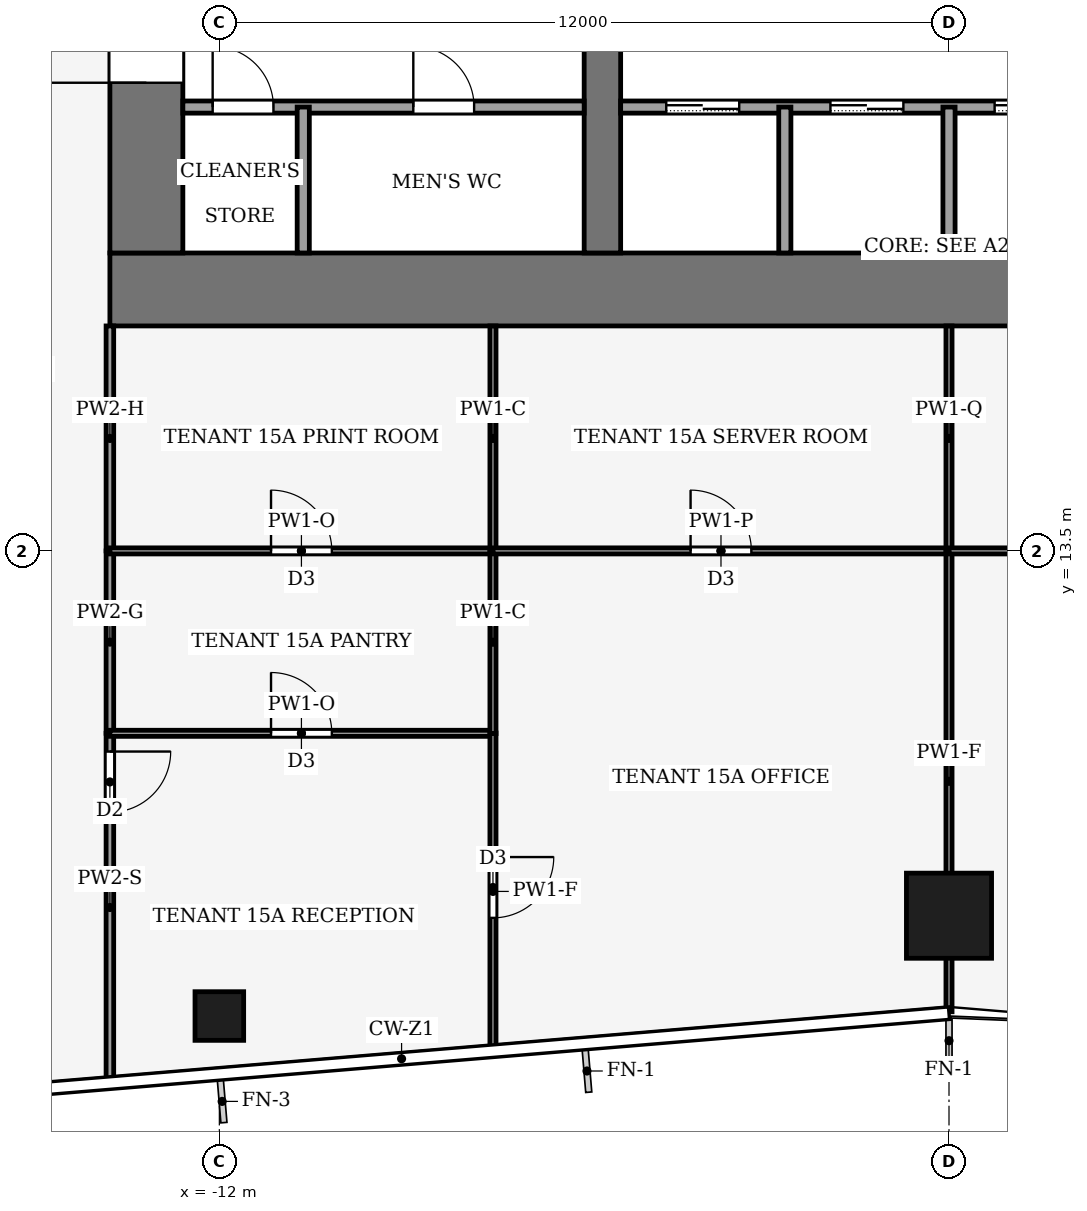
"""IFC4 building model, lengths in metres.
Left out: names, types, materials, properties, quantities, classifications, styles, units other than length and angle.
Written with IfcOpenShell. Run it as: python <this file> out.ifc"""

import sys

from ifc_helpers import new_model, si_unit, direction, frame, frame_2d, origin, origin_2d, place, context, subcontext, project, spatial, rectangle, hollow_rectangle, extrude, element, fill, save


model = new_model("IFC4")
c1 = context("Model", 3, precision=1e-05, world=origin(), true_north=direction((0.0, 1.0)))
c2 = subcontext(c1, "Body", "Model", "MODEL_VIEW")
j1 = project(units=[si_unit("LENGTHUNIT", "METRE"), si_unit("PLANEANGLEUNIT", "RADIAN")], contexts=[c1])
p1 = place(None, origin())
s1 = spatial("IfcSite", under=j1, at=p1, CompositionType="ELEMENT")
p2 = place(p1, origin())
s2 = spatial("IfcBuilding", under=s1, at=p2, CompositionType="ELEMENT")
p3 = place(p2, frame((0.0, 0.0, 70.0)))
s3 = spatial("IfcBuildingStorey", under=s2, at=p3, CompositionType="ELEMENT", Elevation=70.0)
p4 = place(p3, frame((-13.8, 17.8, -0.13), z_axis=(0.0, 0.0, 1.0), x_axis=(1.0, 0.0, 0.0)))
e1 = element("IfcWall", 1, at=p4, inside=s3, PredefinedType="SHEAR", context=c2, shape_type="SweptSolid", body=[
    extrude(rectangle(XDim=27.6, YDim=1.2, at=frame_2d((13.8, 0.0))), origin(), (0.0, 0.0, 1.0), 4.0),
])
p5 = place(p3, frame((-13.2, 18.4, -0.13), z_axis=(0.0, 0.0, 1.0), x_axis=(0.0, 1.0, 0.0)))
e2 = element("IfcWall", 2, at=p5, inside=s3, PredefinedType="SHEAR", context=c2, shape_type="SweptSolid", body=[
    extrude(rectangle(XDim=19.2, YDim=1.2, at=frame_2d((9.6, 0.0))), origin(), (0.0, 0.0, 1.0), 4.0),
])
p6 = place(p5, frame((2.8, 0.0, 0.13)))
e3 = element("IfcOpeningElement", 3, at=p6, cuts=e2, PredefinedType="OPENING", context=c2, shape_type="SweptSolid", body=[
    extrude(rectangle(XDim=2.4, YDim=2.4, at=frame_2d((1.2, 1.2))), frame((0.0, 0.61, 0.0), z_axis=(0.0, -1.0, 0.0), x_axis=(1.0, 0.0, 0.0)), (0.0, 0.0, 1.0), 1.22),
])
p7 = place(p5, frame((13.4, 0.0, 0.13)))
e4 = element("IfcOpeningElement", 4, at=p7, cuts=e2, PredefinedType="OPENING", context=c2, shape_type="SweptSolid", body=[
    extrude(rectangle(XDim=1.4, YDim=2.2, at=frame_2d((0.7, 1.1))), frame((0.0, 0.61, 0.0), z_axis=(0.0, -1.0, 0.0), x_axis=(1.0, 0.0, 0.0)), (0.0, 0.0, 1.0), 1.22),
])
p8 = place(p3, frame((-5.7, 18.4, -0.13), z_axis=(0.0, 0.0, 1.0), x_axis=(0.0, 1.0, 0.0)))
e5 = element("IfcWall", 5, at=p8, inside=s3, PredefinedType="SHEAR", context=c2, shape_type="SweptSolid", body=[
    extrude(rectangle(XDim=19.2, YDim=0.6, at=frame_2d((9.6, 0.0))), origin(), (0.0, 0.0, 1.0), 4.0),
])
p9 = place(p8, frame((8.35, 0.0, 0.13)))
e6 = element("IfcOpeningElement", 6, at=p9, cuts=e5, PredefinedType="OPENING", context=c2, shape_type="SweptSolid", body=[
    extrude(rectangle(XDim=0.9, YDim=2.1, at=frame_2d((0.45, 1.05))), frame((0.0, 0.31, 0.0), z_axis=(0.0, -1.0, 0.0), x_axis=(1.0, 0.0, 0.0)), (0.0, 0.0, 1.0), 0.62),
])
p10 = place(p3, frame((0.0, 7.5, 0.0), z_axis=(0.0, 0.0, 1.0), x_axis=(1.0, 0.0, 0.0)))
e7 = element("IfcColumn", 7, at=p10, inside=s3, PredefinedType="COLUMN", context=c2, shape_type="SweptSolid", body=[
    extrude(hollow_rectangle(XDim=1.4, YDim=1.4, WallThickness=0.08, at=origin_2d()), origin(), (0.0, 0.0, 1.0), 4.0),
])
p11 = place(p3, frame((-12.0, 5.85, 0.0), z_axis=(0.0, 0.0, 1.0), x_axis=(1.0, 0.0, 0.0)))
e8 = element("IfcColumn", 8, at=p11, inside=s3, PredefinedType="COLUMN", context=c2, shape_type="SweptSolid", body=[
    extrude(hollow_rectangle(XDim=0.8, YDim=0.8, WallThickness=0.04, at=origin_2d()), origin(), (0.0, 0.0, 1.0), 4.0),
])
p12 = place(p3, frame((-12.6, 20.8, 0.0), z_axis=(0.0, 0.0, 1.0), x_axis=(1.0, 0.0, 0.0)))
e9 = element("IfcWall", 9, at=p12, inside=s3, PredefinedType="PARTITIONING", context=c2, shape_type="SweptSolid", body=[
    extrude(rectangle(XDim=6.6, YDim=0.2, at=frame_2d((3.3, 0.0))), origin(), (0.0, 0.0, 1.0), 3.87),
])
p13 = place(p12, frame((0.49, 0.0, 0.0)))
e10 = element("IfcOpeningElement", 10, at=p13, cuts=e9, PredefinedType="OPENING", context=c2, shape_type="SweptSolid", body=[
    extrude(rectangle(XDim=1.0, YDim=2.1, at=frame_2d((0.5, 1.05))), frame((0.0, 0.11, 0.0), z_axis=(0.0, -1.0, 0.0), x_axis=(1.0, 0.0, 0.0)), (0.0, 0.0, 1.0), 0.22),
])
p14 = place(p12, frame((3.79, 0.0, 0.0)))
e11 = element("IfcOpeningElement", 11, at=p14, cuts=e9, PredefinedType="OPENING", context=c2, shape_type="SweptSolid", body=[
    extrude(rectangle(XDim=1.0, YDim=2.1, at=frame_2d((0.5, 1.05))), frame((0.0, 0.11, 0.0), z_axis=(0.0, -1.0, 0.0), x_axis=(1.0, 0.0, 0.0)), (0.0, 0.0, 1.0), 0.22),
])
p15 = place(p3, frame((-5.4, 20.8, 0.0), z_axis=(0.0, 0.0, 1.0), x_axis=(1.0, 0.0, 0.0)))
e12 = element("IfcWall", 12, at=p15, inside=s3, PredefinedType="PARTITIONING", context=c2, shape_type="SweptSolid", body=[
    extrude(rectangle(XDim=10.8, YDim=0.2, at=frame_2d((5.4, 0.0))), origin(), (0.0, 0.0, 1.0), 3.87),
])
p16 = place(p15, frame((0.75, 0.0, 0.0)))
e13 = element("IfcOpeningElement", 13, at=p16, cuts=e12, PredefinedType="OPENING", context=c2, shape_type="SweptSolid", body=[
    extrude(rectangle(XDim=1.2, YDim=2.2, at=frame_2d((0.6, 1.1))), frame((0.0, 0.11, 0.0), z_axis=(0.0, -1.0, 0.0), x_axis=(1.0, 0.0, 0.0)), (0.0, 0.0, 1.0), 0.22),
])
p17 = place(p15, frame((3.45, 0.0, 0.0)))
e14 = element("IfcOpeningElement", 14, at=p17, cuts=e12, PredefinedType="OPENING", context=c2, shape_type="SweptSolid", body=[
    extrude(rectangle(XDim=1.2, YDim=2.2, at=frame_2d((0.6, 1.1))), frame((0.0, 0.11, 0.0), z_axis=(0.0, -1.0, 0.0), x_axis=(1.0, 0.0, 0.0)), (0.0, 0.0, 1.0), 0.22),
])
p18 = place(p15, frame((6.15, 0.0, 0.0)))
e15 = element("IfcOpeningElement", 15, at=p18, cuts=e12, PredefinedType="OPENING", context=c2, shape_type="SweptSolid", body=[
    extrude(rectangle(XDim=1.2, YDim=2.2, at=frame_2d((0.6, 1.1))), frame((0.0, 0.11, 0.0), z_axis=(0.0, -1.0, 0.0), x_axis=(1.0, 0.0, 0.0)), (0.0, 0.0, 1.0), 0.22),
])
p19 = place(p15, frame((8.85, 0.0, 0.0)))
e16 = element("IfcOpeningElement", 16, at=p19, cuts=e12, PredefinedType="OPENING", context=c2, shape_type="SweptSolid", body=[
    extrude(rectangle(XDim=1.2, YDim=2.2, at=frame_2d((0.6, 1.1))), frame((0.0, 0.11, 0.0), z_axis=(0.0, -1.0, 0.0), x_axis=(1.0, 0.0, 0.0)), (0.0, 0.0, 1.0), 0.22),
])
for number, where, z_axis, x_axis in (
    (17, (-10.62, 18.4, 0.0), (0.0, 0.0, 1.0), (0.0, 1.0, 0.0)),
    (18, (-2.7, 18.4, 0.0), (0.0, 0.0, 1.0), (0.0, 1.0, 0.0)),
    (19, (0.0, 18.4, 0.0), (0.0, 0.0, 1.0), (0.0, 1.0, 0.0)),
):
    element("IfcWall", number, at=place(p3, frame(where, z_axis=z_axis, x_axis=x_axis)), inside=s3, PredefinedType="PARTITIONING", context=c2, shape_type="SweptSolid", body=[
        extrude(rectangle(XDim=2.4, YDim=0.2, at=frame_2d((1.2, 0.0))), origin(), (0.0, 0.0, 1.0), 3.87),
    ])
p20 = place(p3, frame((-13.8, 10.5, 0.0), z_axis=(0.0, 0.0, 1.0), x_axis=(0.0, -1.0, 0.0)))
e20 = element("IfcWall", 20, at=p20, inside=s3, PredefinedType="PARTITIONING", context=c2, shape_type="SweptSolid", body=[
    extrude(rectangle(XDim=5.73, YDim=0.125, at=frame_2d((2.865, 0.0))), origin(), (0.0, 0.0, 1.0), 3.04),
])
p21 = place(p20, frame((0.3, 0.0, 0.0)))
e21 = element("IfcOpeningElement", 21, at=p21, cuts=e20, PredefinedType="OPENING", context=c2, shape_type="SweptSolid", body=[
    extrude(rectangle(XDim=1.0, YDim=2.1, at=frame_2d((0.5, 1.05))), frame((0.0, 0.073, 0.0), z_axis=(0.0, -1.0, 0.0), x_axis=(1.0, 0.0, 0.0)), (0.0, 0.0, 1.0), 0.145),
])
p22 = place(p3, frame((-13.8, 10.5, 0.0), z_axis=(0.0, 0.0, 1.0), x_axis=(0.0, 1.0, 0.0)))
e22 = element("IfcWall", 22, at=p22, inside=s3, PredefinedType="PARTITIONING", context=c2, shape_type="SweptSolid", body=[
    extrude(rectangle(XDim=3.0, YDim=0.125, at=frame_2d((1.5, 0.0))), origin(), (0.0, 0.0, 1.0), 3.87),
])
p23 = place(p3, frame((-13.8, 13.5, 0.0), z_axis=(0.0, 0.0, 1.0), x_axis=(0.0, 1.0, 0.0)))
e23 = element("IfcWall", 23, at=p23, inside=s3, PredefinedType="PARTITIONING", context=c2, shape_type="SweptSolid", body=[
    extrude(rectangle(XDim=3.7, YDim=0.125, at=frame_2d((1.85, 0.0))), origin(), (0.0, 0.0, 1.0), 3.14),
])
p24 = place(p3, frame((-13.8, 10.5, 0.0), z_axis=(0.0, 0.0, 1.0), x_axis=(1.0, 0.0, 0.0)))
e24 = element("IfcWall", 24, at=p24, inside=s3, PredefinedType="PARTITIONING", context=c2, shape_type="SweptSolid", body=[
    extrude(rectangle(XDim=6.3, YDim=0.1, at=frame_2d((3.15, 0.0))), origin(), (0.0, 0.0, 1.0), 3.39),
])
p25 = place(p24, frame((2.65, 0.0, 0.0)))
e25 = element("IfcOpeningElement", 25, at=p25, cuts=e24, PredefinedType="OPENING", context=c2, shape_type="SweptSolid", body=[
    extrude(rectangle(XDim=1.0, YDim=2.1, at=frame_2d((0.5, 1.05))), frame((0.0, 0.06, 0.0), z_axis=(0.0, -1.0, 0.0), x_axis=(1.0, 0.0, 0.0)), (0.0, 0.0, 1.0), 0.12),
])
p26 = place(p3, frame((-7.5, 10.504, 0.0), z_axis=(0.0, 0.0, 1.0), x_axis=(0.0, -1.0, 0.0)))
e26 = element("IfcWall", 26, at=p26, inside=s3, PredefinedType="PARTITIONING", context=c2, shape_type="SweptSolid", body=[
    extrude(rectangle(XDim=5.209, YDim=0.1, at=frame_2d((2.604, 0.0))), origin(), (0.0, 0.0, 1.0), 3.04),
])
p27 = place(p26, frame((2.039, 0.0, 0.0)))
e27 = element("IfcOpeningElement", 27, at=p27, cuts=e26, PredefinedType="OPENING", context=c2, shape_type="SweptSolid", body=[
    extrude(rectangle(XDim=1.0, YDim=2.1, at=frame_2d((0.5, 1.05))), frame((0.0, 0.06, 0.0), z_axis=(0.0, -1.0, 0.0), x_axis=(1.0, 0.0, 0.0)), (0.0, 0.0, 1.0), 0.12),
])
p28 = place(p3, frame((-13.8, 13.5, 0.0), z_axis=(0.0, 0.0, 1.0), x_axis=(1.0, 0.0, 0.0)))
e28 = element("IfcWall", 28, at=p28, inside=s3, PredefinedType="PARTITIONING", context=c2, shape_type="SweptSolid", body=[
    extrude(rectangle(XDim=6.3, YDim=0.1, at=frame_2d((3.15, 0.0))), origin(), (0.0, 0.0, 1.0), 3.39),
])
p29 = place(p28, frame((2.65, 0.0, 0.0)))
e29 = element("IfcOpeningElement", 29, at=p29, cuts=e28, PredefinedType="OPENING", context=c2, shape_type="SweptSolid", body=[
    extrude(rectangle(XDim=1.0, YDim=2.1, at=frame_2d((0.5, 1.05))), frame((0.0, 0.06, 0.0), z_axis=(0.0, -1.0, 0.0), x_axis=(1.0, 0.0, 0.0)), (0.0, 0.0, 1.0), 0.12),
])
p30 = place(p3, frame((-7.5, 10.496, 0.0), z_axis=(0.0, 0.0, 1.0), x_axis=(0.0, 1.0, 0.0)))
e30 = element("IfcWall", 30, at=p30, inside=s3, PredefinedType="PARTITIONING", context=c2, shape_type="SweptSolid", body=[
    extrude(rectangle(XDim=3.004, YDim=0.1, at=frame_2d((1.502, 0.0))), origin(), (0.0, 0.0, 1.0), 3.87),
])
p31 = place(p3, frame((-7.5, 13.5, 0.0), z_axis=(0.0, 0.0, 1.0), x_axis=(0.0, 1.0, 0.0)))
e31 = element("IfcWall", 31, at=p31, inside=s3, PredefinedType="PARTITIONING", context=c2, shape_type="SweptSolid", body=[
    extrude(rectangle(XDim=3.7, YDim=0.1, at=frame_2d((1.85, 0.0))), origin(), (0.0, 0.0, 1.0), 3.87),
])
p32 = place(p3, frame((-7.5, 13.5, 0.0), z_axis=(0.0, 0.0, 1.0), x_axis=(1.0, 0.0, 0.0)))
e32 = element("IfcWall", 32, at=p32, inside=s3, PredefinedType="PARTITIONING", context=c2, shape_type="SweptSolid", body=[
    extrude(rectangle(XDim=7.5, YDim=0.1, at=frame_2d((3.75, 0.0))), origin(), (0.0, 0.0, 1.0), 3.44),
])
p33 = place(p32, frame((3.25, 0.0, 0.0)))
e33 = element("IfcOpeningElement", 33, at=p33, cuts=e32, PredefinedType="OPENING", context=c2, shape_type="SweptSolid", body=[
    extrude(rectangle(XDim=1.0, YDim=2.1, at=frame_2d((0.5, 1.05))), frame((0.0, 0.06, 0.0), z_axis=(0.0, -1.0, 0.0), x_axis=(1.0, 0.0, 0.0)), (0.0, 0.0, 1.0), 0.12),
])
p34 = place(p3, frame((0.0, 5.92, 0.0), z_axis=(0.0, 0.0, 1.0), x_axis=(0.0, 1.0, 0.0)))
e34 = element("IfcWall", 34, at=p34, inside=s3, PredefinedType="PARTITIONING", context=c2, shape_type="SweptSolid", body=[
    extrude(rectangle(XDim=7.58, YDim=0.1, at=frame_2d((3.79, 0.0))), origin(), (0.0, 0.0, 1.0), 3.04),
])
p35 = place(p3, frame((0.0, 13.5, 0.0), z_axis=(0.0, 0.0, 1.0), x_axis=(0.0, 1.0, 0.0)))
e35 = element("IfcWall", 35, at=p35, inside=s3, PredefinedType="PARTITIONING", context=c2, shape_type="SweptSolid", body=[
    extrude(rectangle(XDim=3.7, YDim=0.1, at=frame_2d((1.85, 0.0))), origin(), (0.0, 0.0, 1.0), 3.48),
])
p36 = place(p3, frame((0.0, 13.5, 0.0), z_axis=(0.0, 0.0, 1.0), x_axis=(1.0, 0.0, 0.0)))
e36 = element("IfcWall", 36, at=p36, inside=s3, PredefinedType="PARTITIONING", context=c2, shape_type="SweptSolid", body=[
    extrude(rectangle(XDim=7.5, YDim=0.1, at=frame_2d((3.75, 0.0))), origin(), (0.0, 0.0, 1.0), 3.44),
])
p37 = place(p36, frame((3.25, 0.0, 0.0)))
e37 = element("IfcOpeningElement", 37, at=p37, cuts=e36, PredefinedType="OPENING", context=c2, shape_type="SweptSolid", body=[
    extrude(rectangle(XDim=1.0, YDim=2.1, at=frame_2d((0.5, 1.05))), frame((0.0, 0.06, 0.0), z_axis=(0.0, -1.0, 0.0), x_axis=(1.0, 0.0, 0.0)), (0.0, 0.0, 1.0), 0.12),
])
p38 = place(p16, origin())
e38 = element("IfcDoor", 38, at=p38, inside=s3, OperationType="SLIDING_TO_LEFT", PredefinedType="DOOR", context=c2, shape_type="SweptSolid", body=[
    extrude(rectangle(XDim=1.2, YDim=2.2, at=frame_2d((0.6, 1.1))), frame((0.0, 0.025, 0.0), z_axis=(0.0, -1.0, 0.0), x_axis=(1.0, 0.0, 0.0)), (0.0, 0.0, 1.0), 0.05),
])
fill(e13, e38)
p39 = place(p17, origin())
e39 = element("IfcDoor", 39, at=p39, inside=s3, OperationType="SLIDING_TO_LEFT", PredefinedType="DOOR", context=c2, shape_type="SweptSolid", body=[
    extrude(rectangle(XDim=1.2, YDim=2.2, at=frame_2d((0.6, 1.1))), frame((0.0, 0.025, 0.0), z_axis=(0.0, -1.0, 0.0), x_axis=(1.0, 0.0, 0.0)), (0.0, 0.0, 1.0), 0.05),
])
fill(e14, e39)
p40 = place(p18, origin())
e40 = element("IfcDoor", 40, at=p40, inside=s3, OperationType="SLIDING_TO_LEFT", PredefinedType="DOOR", context=c2, shape_type="SweptSolid", body=[
    extrude(rectangle(XDim=1.2, YDim=2.2, at=frame_2d((0.6, 1.1))), frame((0.0, 0.025, 0.0), z_axis=(0.0, -1.0, 0.0), x_axis=(1.0, 0.0, 0.0)), (0.0, 0.0, 1.0), 0.05),
])
fill(e15, e40)
p41 = place(p13, origin())
e41 = element("IfcDoor", 41, at=p41, inside=s3, OperationType="SINGLE_SWING_RIGHT", PredefinedType="DOOR", context=c2, shape_type="SweptSolid", body=[
    extrude(rectangle(XDim=1.0, YDim=2.1, at=frame_2d((0.5, 1.05))), frame((0.0, 0.025, 0.0), z_axis=(0.0, -1.0, 0.0), x_axis=(1.0, 0.0, 0.0)), (0.0, 0.0, 1.0), 0.05),
])
fill(e10, e41)
p42 = place(p14, origin())
e42 = element("IfcDoor", 42, at=p42, inside=s3, OperationType="SINGLE_SWING_RIGHT", PredefinedType="DOOR", context=c2, shape_type="SweptSolid", body=[
    extrude(rectangle(XDim=1.0, YDim=2.1, at=frame_2d((0.5, 1.05))), frame((0.0, 0.025, 0.0), z_axis=(0.0, -1.0, 0.0), x_axis=(1.0, 0.0, 0.0)), (0.0, 0.0, 1.0), 0.05),
])
fill(e11, e42)
p43 = place(p6, origin())
e43 = element("IfcDoor", 43, at=p43, inside=s3, OperationType="DOUBLE_DOOR_SINGLE_SWING", PredefinedType="DOOR", context=c2, shape_type="SweptSolid", body=[
    extrude(rectangle(XDim=2.4, YDim=2.4, at=frame_2d((1.2, 1.2))), frame((0.0, 0.025, 0.0), z_axis=(0.0, -1.0, 0.0), x_axis=(1.0, 0.0, 0.0)), (0.0, 0.0, 1.0), 0.05),
])
fill(e3, e43)
p44 = place(p21, origin())
e44 = element("IfcDoor", 44, at=p44, inside=s3, OperationType="SINGLE_SWING_LEFT", PredefinedType="DOOR", context=c2, shape_type="SweptSolid", body=[
    extrude(rectangle(XDim=1.0, YDim=2.1, at=frame_2d((0.5, 1.05))), frame((0.0, 0.025, 0.0), z_axis=(0.0, -1.0, 0.0), x_axis=(1.0, 0.0, 0.0)), (0.0, 0.0, 1.0), 0.05),
])
fill(e21, e44)
p45 = place(p25, origin())
e45 = element("IfcDoor", 45, at=p45, inside=s3, OperationType="SINGLE_SWING_LEFT", PredefinedType="DOOR", context=c2, shape_type="SweptSolid", body=[
    extrude(rectangle(XDim=1.0, YDim=2.1, at=frame_2d((0.5, 1.05))), frame((0.0, 0.025, 0.0), z_axis=(0.0, -1.0, 0.0), x_axis=(1.0, 0.0, 0.0)), (0.0, 0.0, 1.0), 0.05),
])
fill(e25, e45)
p46 = place(p27, origin())
e46 = element("IfcDoor", 46, at=p46, inside=s3, OperationType="SINGLE_SWING_LEFT", PredefinedType="DOOR", context=c2, shape_type="SweptSolid", body=[
    extrude(rectangle(XDim=1.0, YDim=2.1, at=frame_2d((0.5, 1.05))), frame((0.0, 0.025, 0.0), z_axis=(0.0, -1.0, 0.0), x_axis=(1.0, 0.0, 0.0)), (0.0, 0.0, 1.0), 0.05),
])
fill(e27, e46)
p47 = place(p29, origin())
e47 = element("IfcDoor", 47, at=p47, inside=s3, OperationType="SINGLE_SWING_LEFT", PredefinedType="DOOR", context=c2, shape_type="SweptSolid", body=[
    extrude(rectangle(XDim=1.0, YDim=2.1, at=frame_2d((0.5, 1.05))), frame((0.0, 0.025, 0.0), z_axis=(0.0, -1.0, 0.0), x_axis=(1.0, 0.0, 0.0)), (0.0, 0.0, 1.0), 0.05),
])
fill(e29, e47)
p48 = place(p33, origin())
e48 = element("IfcDoor", 48, at=p48, inside=s3, OperationType="SINGLE_SWING_RIGHT", PredefinedType="DOOR", context=c2, shape_type="SweptSolid", body=[
    extrude(rectangle(XDim=1.0, YDim=2.1, at=frame_2d((0.5, 1.05))), frame((0.0, 0.025, 0.0), z_axis=(0.0, -1.0, 0.0), x_axis=(1.0, 0.0, 0.0)), (0.0, 0.0, 1.0), 0.05),
])
fill(e33, e48)
save(model, sys.argv[1])
